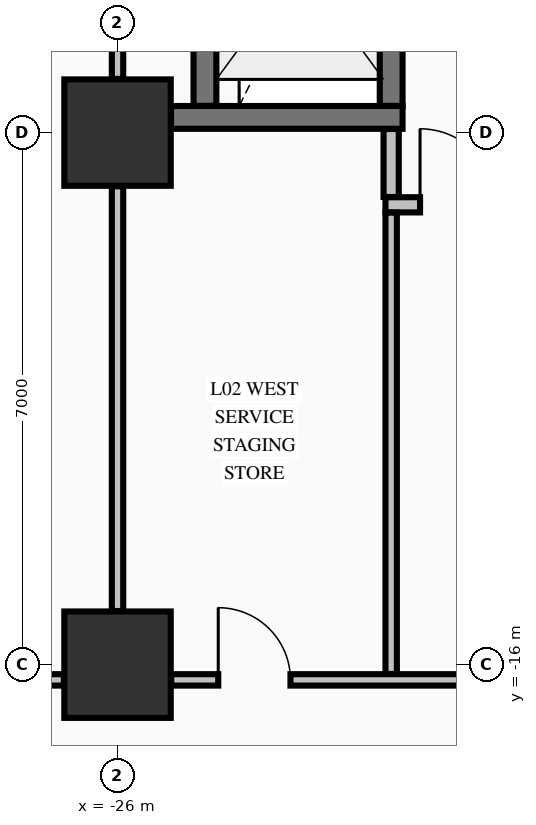
"""IFC4 building model, lengths in metres.
Left out: names, types, materials, properties, quantities, classifications, styles, units other than length and angle.
Written with IfcOpenShell. Run it as: python <this file> out.ifc"""

import sys

from ifc_helpers import new_model, si_unit, direction, frame, frame_2d, origin, origin_2d, place, context, subcontext, project, spatial, rectangle, extrude, element, fill, save


model = new_model("IFC4")
c1 = context("Model", 3, precision=1e-05, world=origin(), true_north=direction((0.0, 1.0)))
c2 = subcontext(c1, "Body", "Model", "MODEL_VIEW")
j1 = project(units=[si_unit("LENGTHUNIT", "METRE"), si_unit("PLANEANGLEUNIT", "RADIAN")], contexts=[c1])
p1 = place(None, origin())
s1 = spatial("IfcSite", under=j1, at=p1, CompositionType="ELEMENT")
p2 = place(p1, origin())
s2 = spatial("IfcBuilding", under=s1, at=p2, CompositionType="ELEMENT")
p3 = place(p2, frame((0.0, 0.0, 10.88)))
s3 = spatial("IfcBuildingStorey", under=s2, at=p3, CompositionType="ELEMENT", Elevation=10.88)
for number, where, z_axis, x_axis in (
    (1, (-26.0, -16.0, 0.0), (0.0, 0.0, 1.0), (1.0, 0.0, 0.0)),
    (2, (-26.0, -9.0, 0.0), (0.0, 0.0, 1.0), (1.0, 0.0, 0.0)),
):
    element("IfcColumn", number, at=place(p3, frame(where, z_axis=z_axis, x_axis=x_axis)), inside=s3, PredefinedType="COLUMN", context=c2, shape_type="SweptSolid", body=[
        extrude(rectangle(XDim=1.4, YDim=1.4, at=origin_2d()), origin(), (0.0, 0.0, 1.0), 5.09),
    ])
p4 = place(p3, frame((-25.296, -8.8, 0.0), z_axis=(0.0, 0.0, 1.0), x_axis=(1.0, 0.0, 0.0)))
e3 = element("IfcWall", 3, at=p4, inside=s3, PredefinedType="SHEAR", context=c2, shape_type="SweptSolid", body=[
    extrude(rectangle(XDim=3.046, YDim=0.3, at=frame_2d((1.523, 0.0))), origin(), (0.0, 0.0, 1.0), 5.09),
])
p5 = place(p3, frame((-29.294, -16.2, 0.0), z_axis=(0.0, 0.0, 1.0), x_axis=(1.0, 0.0, 0.0)))
e4 = element("IfcWall", 4, at=p5, inside=s3, PredefinedType="PARTITIONING", context=c2, shape_type="SweptSolid", body=[
    extrude(rectangle(XDim=2.588, YDim=0.15, at=frame_2d((1.294, 0.0))), origin(), (0.0, 0.0, 1.0), 4.132),
])
p6 = place(p5, frame((1.019, 0.0, 0.0)))
e5 = element("IfcOpeningElement", 5, at=p6, cuts=e4, PredefinedType="OPENING", context=c2, shape_type="SweptSolid", body=[
    extrude(rectangle(XDim=1.05, YDim=2.15, at=frame_2d((0.525, 1.075))), frame((0.0, 0.085, 0.0), z_axis=(0.0, -1.0, 0.0), x_axis=(1.0, 0.0, 0.0)), (0.0, 0.0, 1.0), 0.17),
])
p7 = place(p3, frame((-25.294, -16.2, 0.0), z_axis=(0.0, 0.0, 1.0), x_axis=(1.0, 0.0, 0.0)))
e6 = element("IfcWall", 6, at=p7, inside=s3, PredefinedType="PARTITIONING", context=c2, shape_type="SweptSolid", body=[
    extrude(rectangle(XDim=4.488, YDim=0.15, at=frame_2d((2.244, 0.0))), origin(), (0.0, 0.0, 1.0), 4.132),
])
p8 = place(p7, frame((0.619, 0.0, 0.0)))
e7 = element("IfcOpeningElement", 7, at=p8, cuts=e6, PredefinedType="OPENING", context=c2, shape_type="SweptSolid", body=[
    extrude(rectangle(XDim=0.95, YDim=2.15, at=frame_2d((0.475, 1.075))), frame((0.0, 0.085, 0.0), z_axis=(0.0, -1.0, 0.0), x_axis=(1.0, 0.0, 0.0)), (0.0, 0.0, 1.0), 0.17),
])
p9 = place(p3, frame((-22.475, -9.95, 0.0), z_axis=(0.0, 0.0, 1.0), x_axis=(1.0, 0.0, 0.0)))
e8 = element("IfcWall", 8, at=p9, inside=s3, PredefinedType="PARTITIONING", context=c2, shape_type="SweptSolid", body=[
    extrude(rectangle(XDim=2.55, YDim=0.2, at=frame_2d((1.275, 0.0))), origin(), (0.0, 0.0, 1.0), 5.09),
])
p10 = place(p9, frame((0.455, 0.0, 0.0)))
e9 = element("IfcOpeningElement", 9, at=p10, cuts=e8, PredefinedType="OPENING", context=c2, shape_type="SweptSolid", body=[
    extrude(rectangle(XDim=1.0, YDim=2.15, at=frame_2d((0.5, 1.075))), frame((0.0, 0.11, 0.0), z_axis=(0.0, -1.0, 0.0), x_axis=(1.0, 0.0, 0.0)), (0.0, 0.0, 1.0), 0.22),
])
p11 = place(p3, frame((-24.85, -8.648, 0.0), z_axis=(0.0, 0.0, 1.0), x_axis=(0.0, 1.0, 0.0)))
e10 = element("IfcWall", 10, at=p11, inside=s3, PredefinedType="SHEAR", context=c2, shape_type="SweptSolid", body=[
    extrude(rectangle(XDim=3.696, YDim=0.3, at=frame_2d((1.848, 0.0))), origin(), (0.0, 0.0, 1.0), 5.09),
])
p12 = place(p3, frame((-22.4, -8.648, 0.0), z_axis=(0.0, 0.0, 1.0), x_axis=(0.0, 1.0, 0.0)))
e11 = element("IfcWall", 11, at=p12, inside=s3, PredefinedType="SHEAR", context=c2, shape_type="SweptSolid", body=[
    extrude(rectangle(XDim=3.696, YDim=0.3, at=frame_2d((1.848, 0.0))), origin(), (0.0, 0.0, 1.0), 5.09),
])
p13 = place(p12, frame((1.198, 0.0, 0.0)))
e12 = element("IfcOpeningElement", 12, at=p13, cuts=e11, PredefinedType="OPENING", context=c2, shape_type="SweptSolid", body=[
    extrude(rectangle(XDim=1.3, YDim=2.3, at=frame_2d((0.65, 1.15))), frame((0.0, 0.16, 0.0), z_axis=(0.0, -1.0, 0.0), x_axis=(1.0, 0.0, 0.0)), (0.0, 0.0, 1.0), 0.32),
])
p14 = place(p3, frame((-26.0, -15.294, 0.0), z_axis=(0.0, 0.0, 1.0), x_axis=(0.0, 1.0, 0.0)))
e13 = element("IfcWall", 13, at=p14, inside=s3, PredefinedType="PARTITIONING", context=c2, shape_type="SweptSolid", body=[
    extrude(rectangle(XDim=5.588, YDim=0.15, at=frame_2d((2.794, 0.0))), origin(), (0.0, 0.0, 1.0), 4.132),
])
p15 = place(p3, frame((-26.0, -8.294, 0.0), z_axis=(0.0, 0.0, 1.0), x_axis=(0.0, 1.0, 0.0)))
e14 = element("IfcWall", 14, at=p15, inside=s3, PredefinedType="PARTITIONING", context=c2, shape_type="SweptSolid", body=[
    extrude(rectangle(XDim=7.341, YDim=0.15, at=frame_2d((3.67, 0.0))), origin(), (0.0, 0.0, 1.0), 4.132),
])
p16 = place(p3, frame((-22.4, -16.122, 0.0), z_axis=(0.0, 0.0, 1.0), x_axis=(0.0, 1.0, 0.0)))
e15 = element("IfcWall", 15, at=p16, inside=s3, PredefinedType="PARTITIONING", context=c2, shape_type="SweptSolid", body=[
    extrude(rectangle(XDim=6.069, YDim=0.15, at=frame_2d((3.035, 0.0))), origin(), (0.0, 0.0, 1.0), 5.09),
])
p17 = place(p3, frame((-22.4, -9.847, 0.0), z_axis=(0.0, 0.0, 1.0), x_axis=(0.0, 1.0, 0.0)))
e16 = element("IfcWall", 16, at=p17, inside=s3, PredefinedType="PARTITIONING", context=c2, shape_type="SweptSolid", body=[
    extrude(rectangle(XDim=0.894, YDim=0.2, at=frame_2d((0.447, 0.0))), origin(), (0.0, 0.0, 1.0), 5.09),
])
p18 = place(p10, origin())
e17 = element("IfcDoor", 17, at=p18, inside=s3, OperationType="SINGLE_SWING_LEFT", PredefinedType="DOOR", context=c2, shape_type="SweptSolid", body=[
    extrude(rectangle(XDim=1.0, YDim=2.15, at=frame_2d((0.5, 1.075))), frame((0.0, 0.025, 0.0), z_axis=(0.0, -1.0, 0.0), x_axis=(1.0, 0.0, 0.0)), (0.0, 0.0, 1.0), 0.05),
])
fill(e9, e17)
p19 = place(p8, origin())
e18 = element("IfcDoor", 18, at=p19, inside=s3, OperationType="SINGLE_SWING_LEFT", PredefinedType="DOOR", context=c2, shape_type="SweptSolid", body=[
    extrude(rectangle(XDim=0.95, YDim=2.15, at=frame_2d((0.475, 1.075))), frame((0.0, 0.025, 0.0), z_axis=(0.0, -1.0, 0.0), x_axis=(1.0, 0.0, 0.0)), (0.0, 0.0, 1.0), 0.05),
])
fill(e7, e18)
save(model, sys.argv[1])
